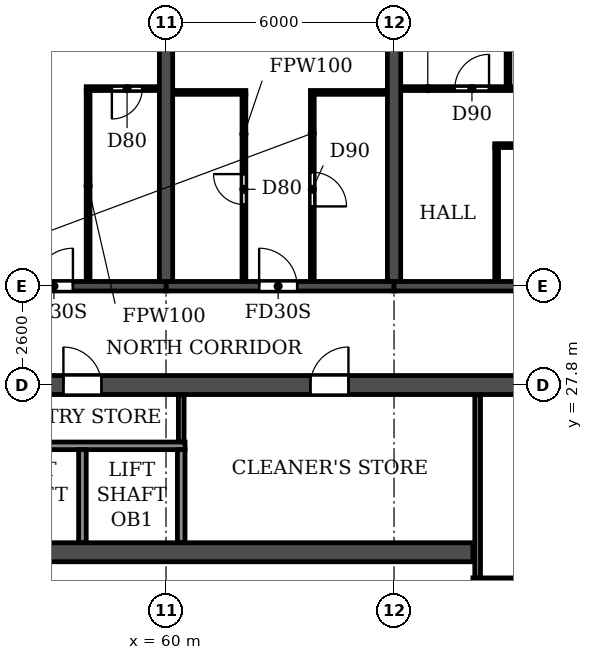
"""IFC4 building model, lengths in metres.
Left out: names, types, materials, properties, quantities, classifications, styles, units other than length and angle.
Written with IfcOpenShell. Run it as: python <this file> out.ifc"""

import sys

from ifc_helpers import new_model, si_unit, direction, frame, frame_2d, origin, place, context, subcontext, project, spatial, rectangle, extrude, element, fill, save


model = new_model("IFC4")
c1 = context("Model", 3, precision=1e-05, world=origin(), true_north=direction((0.0, 1.0)))
c2 = subcontext(c1, "Body", "Model", "MODEL_VIEW")
j1 = project(units=[si_unit("LENGTHUNIT", "METRE"), si_unit("PLANEANGLEUNIT", "RADIAN")], contexts=[c1])
p1 = place(None, origin())
s1 = spatial("IfcSite", under=j1, at=p1, CompositionType="ELEMENT")
p2 = place(p1, origin())
s2 = spatial("IfcBuilding", under=s1, at=p2, CompositionType="ELEMENT")
p3 = place(p2, frame((0.0, 0.0, 102.6)))
s3 = spatial("IfcBuildingStorey", under=s2, at=p3, CompositionType="ELEMENT", Elevation=102.6)
for number, where, z_axis, x_axis in (
    (1, (60.0, 30.525, 0.0), (0.0, 0.0, 1.0), (0.0, 1.0, 0.0)),
    (2, (66.0, 30.525, 0.0), (0.0, 0.0, 1.0), (0.0, 1.0, 0.0)),
):
    element("IfcWall", number, at=place(p3, frame(where, z_axis=z_axis, x_axis=x_axis)), inside=s3, PredefinedType="SHEAR", context=c2, shape_type="SweptSolid", body=[
        extrude(rectangle(XDim=12.875, YDim=0.35, at=frame_2d((6.438, 0.0))), origin(), (0.0, 0.0, 1.0), 3.0),
    ])
p4 = place(p3, frame((54.0, 30.4, 0.0), z_axis=(0.0, 0.0, 1.0), x_axis=(1.0, 0.0, 0.0)))
e3 = element("IfcWall", 3, at=p4, inside=s3, PredefinedType="SHEAR", context=c2, shape_type="SweptSolid", body=[
    extrude(rectangle(XDim=6.0, YDim=0.25, at=frame_2d((3.0, 0.0))), origin(), (0.0, 0.0, 1.0), 2.4),
])
p5 = place(p4, frame((2.55, 0.0, 0.0)))
e4 = element("IfcOpeningElement", 4, at=p5, cuts=e3, PredefinedType="OPENING", context=c2, shape_type="SweptSolid", body=[
    extrude(rectangle(XDim=1.0, YDim=2.1, at=frame_2d((0.5, 1.05))), frame((0.0, 0.135, 0.0), z_axis=(0.0, -1.0, 0.0), x_axis=(1.0, 0.0, 0.0)), (0.0, 0.0, 1.0), 0.27),
])
p6 = place(p3, frame((60.0, 30.4, 0.0), z_axis=(0.0, 0.0, 1.0), x_axis=(1.0, 0.0, 0.0)))
e5 = element("IfcWall", 5, at=p6, inside=s3, PredefinedType="SHEAR", context=c2, shape_type="SweptSolid", body=[
    extrude(rectangle(XDim=6.0, YDim=0.25, at=frame_2d((3.0, 0.0))), origin(), (0.0, 0.0, 1.0), 2.4),
])
p7 = place(p6, frame((2.45, 0.0, 0.0)))
e6 = element("IfcOpeningElement", 6, at=p7, cuts=e5, PredefinedType="OPENING", context=c2, shape_type="SweptSolid", body=[
    extrude(rectangle(XDim=1.0, YDim=2.1, at=frame_2d((0.5, 1.05))), frame((0.0, 0.135, 0.0), z_axis=(0.0, -1.0, 0.0), x_axis=(1.0, 0.0, 0.0)), (0.0, 0.0, 1.0), 0.27),
])
p8 = place(p3, frame((66.0, 30.4, 0.0), z_axis=(0.0, 0.0, 1.0), x_axis=(1.0, 0.0, 0.0)))
e7 = element("IfcWall", 7, at=p8, inside=s3, PredefinedType="SHEAR", context=c2, shape_type="SweptSolid", body=[
    extrude(rectangle(XDim=6.0, YDim=0.25, at=frame_2d((3.0, 0.0))), origin(), (0.0, 0.0, 1.0), 2.4),
])
p9 = place(p3, frame((8.6, 27.8, 0.0), z_axis=(0.0, 0.0, 1.0), x_axis=(1.0, 0.0, 0.0)))
e8 = element("IfcWall", 8, at=p9, inside=s3, PredefinedType="SOLIDWALL", context=c2, shape_type="SweptSolid", body=[
    extrude(rectangle(XDim=84.8, YDim=0.5, at=frame_2d((42.4, 0.0))), origin(), (0.0, 0.0, 1.0), 3.0),
])
p10 = place(p9, frame((1.35, 0.0, 0.0)))
e9 = element("IfcOpeningElement", 9, at=p10, cuts=e8, PredefinedType="OPENING", context=c2, shape_type="SweptSolid", body=[
    extrude(rectangle(XDim=1.0, YDim=2.1, at=frame_2d((0.5, 1.05))), frame((0.0, 0.26, 0.0), z_axis=(0.0, -1.0, 0.0), x_axis=(1.0, 0.0, 0.0)), (0.0, 0.0, 1.0), 0.52),
])
p11 = place(p9, frame((6.05, 0.0, 0.0)))
e10 = element("IfcOpeningElement", 10, at=p11, cuts=e8, PredefinedType="OPENING", context=c2, shape_type="SweptSolid", body=[
    extrude(rectangle(XDim=1.0, YDim=2.1, at=frame_2d((0.5, 1.05))), frame((0.0, 0.26, 0.0), z_axis=(0.0, -1.0, 0.0), x_axis=(1.0, 0.0, 0.0)), (0.0, 0.0, 1.0), 0.52),
])
p12 = place(p9, frame((10.3, 0.0, 0.0)))
e11 = element("IfcOpeningElement", 11, at=p12, cuts=e8, PredefinedType="OPENING", context=c2, shape_type="SweptSolid", body=[
    extrude(rectangle(XDim=1.0, YDim=2.1, at=frame_2d((0.5, 1.05))), frame((0.0, 0.26, 0.0), z_axis=(0.0, -1.0, 0.0), x_axis=(1.0, 0.0, 0.0)), (0.0, 0.0, 1.0), 0.52),
])
p13 = place(p9, frame((13.65, 0.0, 0.0)))
e12 = element("IfcOpeningElement", 12, at=p13, cuts=e8, PredefinedType="OPENING", context=c2, shape_type="SweptSolid", body=[
    extrude(rectangle(XDim=0.9, YDim=2.1, at=frame_2d((0.45, 1.05))), frame((0.0, 0.26, 0.0), z_axis=(0.0, -1.0, 0.0), x_axis=(1.0, 0.0, 0.0)), (0.0, 0.0, 1.0), 0.52),
])
p14 = place(p9, frame((22.85, 0.0, 0.0)))
e13 = element("IfcOpeningElement", 13, at=p14, cuts=e8, PredefinedType="OPENING", context=c2, shape_type="SweptSolid", body=[
    extrude(rectangle(XDim=0.9, YDim=2.1, at=frame_2d((0.45, 1.05))), frame((0.0, 0.26, 0.0), z_axis=(0.0, -1.0, 0.0), x_axis=(1.0, 0.0, 0.0)), (0.0, 0.0, 1.0), 0.52),
])
p15 = place(p9, frame((28.6, 0.0, 0.0)))
e14 = element("IfcOpeningElement", 14, at=p15, cuts=e8, PredefinedType="OPENING", context=c2, shape_type="SweptSolid", body=[
    extrude(rectangle(XDim=1.0, YDim=2.1, at=frame_2d((0.5, 1.05))), frame((0.0, 0.26, 0.0), z_axis=(0.0, -1.0, 0.0), x_axis=(1.0, 0.0, 0.0)), (0.0, 0.0, 1.0), 0.52),
])
p16 = place(p9, frame((33.8, 0.0, 0.0)))
e15 = element("IfcOpeningElement", 15, at=p16, cuts=e8, PredefinedType="OPENING", context=c2, shape_type="SweptSolid", body=[
    extrude(rectangle(XDim=1.0, YDim=2.1, at=frame_2d((0.5, 1.05))), frame((0.0, 0.26, 0.0), z_axis=(0.0, -1.0, 0.0), x_axis=(1.0, 0.0, 0.0)), (0.0, 0.0, 1.0), 0.52),
])
p17 = place(p9, frame((39.0, 0.0, 0.0)))
e16 = element("IfcOpeningElement", 16, at=p17, cuts=e8, PredefinedType="OPENING", context=c2, shape_type="SweptSolid", body=[
    extrude(rectangle(XDim=1.0, YDim=2.1, at=frame_2d((0.5, 1.05))), frame((0.0, 0.26, 0.0), z_axis=(0.0, -1.0, 0.0), x_axis=(1.0, 0.0, 0.0)), (0.0, 0.0, 1.0), 0.52),
])
p18 = place(p9, frame((41.9, 0.0, 0.0)))
e17 = element("IfcOpeningElement", 17, at=p18, cuts=e8, PredefinedType="OPENING", context=c2, shape_type="SweptSolid", body=[
    extrude(rectangle(XDim=1.0, YDim=2.1, at=frame_2d((0.5, 1.05))), frame((0.0, 0.26, 0.0), z_axis=(0.0, -1.0, 0.0), x_axis=(1.0, 0.0, 0.0)), (0.0, 0.0, 1.0), 0.52),
])
p19 = place(p9, frame((44.8, 0.0, 0.0)))
e18 = element("IfcOpeningElement", 18, at=p19, cuts=e8, PredefinedType="OPENING", context=c2, shape_type="SweptSolid", body=[
    extrude(rectangle(XDim=1.0, YDim=2.1, at=frame_2d((0.5, 1.05))), frame((0.0, 0.26, 0.0), z_axis=(0.0, -1.0, 0.0), x_axis=(1.0, 0.0, 0.0)), (0.0, 0.0, 1.0), 0.52),
])
p20 = place(p9, frame((48.7, 0.0, 0.0)))
e19 = element("IfcOpeningElement", 19, at=p20, cuts=e8, PredefinedType="OPENING", context=c2, shape_type="SweptSolid", body=[
    extrude(rectangle(XDim=1.0, YDim=2.1, at=frame_2d((0.5, 1.05))), frame((0.0, 0.26, 0.0), z_axis=(0.0, -1.0, 0.0), x_axis=(1.0, 0.0, 0.0)), (0.0, 0.0, 1.0), 0.52),
])
p21 = place(p9, frame((55.2, 0.0, 0.0)))
e20 = element("IfcOpeningElement", 20, at=p21, cuts=e8, PredefinedType="OPENING", context=c2, shape_type="SweptSolid", body=[
    extrude(rectangle(XDim=1.0, YDim=2.1, at=frame_2d((0.5, 1.05))), frame((0.0, 0.26, 0.0), z_axis=(0.0, -1.0, 0.0), x_axis=(1.0, 0.0, 0.0)), (0.0, 0.0, 1.0), 0.52),
])
p22 = place(p9, frame((61.05, 0.0, 0.0)))
e21 = element("IfcOpeningElement", 21, at=p22, cuts=e8, PredefinedType="OPENING", context=c2, shape_type="SweptSolid", body=[
    extrude(rectangle(XDim=0.9, YDim=2.1, at=frame_2d((0.45, 1.05))), frame((0.0, 0.26, 0.0), z_axis=(0.0, -1.0, 0.0), x_axis=(1.0, 0.0, 0.0)), (0.0, 0.0, 1.0), 0.52),
])
p23 = place(p9, frame((70.25, 0.0, 0.0)))
e22 = element("IfcOpeningElement", 22, at=p23, cuts=e8, PredefinedType="OPENING", context=c2, shape_type="SweptSolid", body=[
    extrude(rectangle(XDim=0.9, YDim=2.1, at=frame_2d((0.45, 1.05))), frame((0.0, 0.26, 0.0), z_axis=(0.0, -1.0, 0.0), x_axis=(1.0, 0.0, 0.0)), (0.0, 0.0, 1.0), 0.52),
])
p24 = place(p9, frame((73.5, 0.0, 0.0)))
e23 = element("IfcOpeningElement", 23, at=p24, cuts=e8, PredefinedType="OPENING", context=c2, shape_type="SweptSolid", body=[
    extrude(rectangle(XDim=1.0, YDim=2.1, at=frame_2d((0.5, 1.05))), frame((0.0, 0.26, 0.0), z_axis=(0.0, -1.0, 0.0), x_axis=(1.0, 0.0, 0.0)), (0.0, 0.0, 1.0), 0.52),
])
p25 = place(p9, frame((77.95, 0.0, 0.0)))
e24 = element("IfcOpeningElement", 24, at=p25, cuts=e8, PredefinedType="OPENING", context=c2, shape_type="SweptSolid", body=[
    extrude(rectangle(XDim=1.5, YDim=2.1, at=frame_2d((0.75, 1.05))), frame((0.0, 0.26, 0.0), z_axis=(0.0, -1.0, 0.0), x_axis=(1.0, 0.0, 0.0)), (0.0, 0.0, 1.0), 0.52),
])
p26 = place(p9, frame((82.9, 0.0, 0.0)))
e25 = element("IfcOpeningElement", 25, at=p26, cuts=e8, PredefinedType="OPENING", context=c2, shape_type="SweptSolid", body=[
    extrude(rectangle(XDim=1.0, YDim=2.1, at=frame_2d((0.5, 1.05))), frame((0.0, 0.26, 0.0), z_axis=(0.0, -1.0, 0.0), x_axis=(1.0, 0.0, 0.0)), (0.0, 0.0, 1.0), 0.52),
])
p27 = place(p3, frame((33.925, 23.4, 0.0), z_axis=(0.0, 0.0, 1.0), x_axis=(1.0, 0.0, 0.0)))
e26 = element("IfcWall", 26, at=p27, inside=s3, PredefinedType="SOLIDWALL", context=c2, shape_type="SweptSolid", body=[
    extrude(rectangle(XDim=34.15, YDim=0.5, at=frame_2d((17.075, 0.0))), origin(), (0.0, 0.0, 1.0), 3.0),
])
p28 = place(p27, frame((16.175, 0.0, 0.0)))
e27 = element("IfcOpeningElement", 27, at=p28, cuts=e26, PredefinedType="OPENING", context=c2, shape_type="SweptSolid", body=[
    extrude(rectangle(XDim=1.8, YDim=2.1, at=frame_2d((0.9, 1.05))), frame((0.0, 0.26, 0.0), z_axis=(0.0, -1.0, 0.0), x_axis=(1.0, 0.0, 0.0)), (0.0, 0.0, 1.0), 0.52),
])
p29 = place(p27, frame((11.025, 0.0, 0.0)))
e28 = element("IfcOpeningElement", 28, at=p29, cuts=e26, PredefinedType="OPENING", context=c2, shape_type="SweptSolid", body=[
    extrude(rectangle(XDim=1.1, YDim=2.1, at=frame_2d((0.55, 1.05))), frame((0.0, 0.26, 0.0), z_axis=(0.0, -1.0, 0.0), x_axis=(1.0, 0.0, 0.0)), (0.0, 0.0, 1.0), 0.52),
])
p30 = place(p3, frame((68.075, 22.6, 0.0), z_axis=(0.0, 0.0, 1.0), x_axis=(1.0, 0.0, 0.0)))
e29 = element("IfcWall", 29, at=p30, inside=s3, PredefinedType="SOLIDWALL", context=c2, shape_type="SweptSolid", body=[
    extrude(rectangle(XDim=4.05, YDim=0.25, at=frame_2d((2.025, 0.0))), origin(), (0.0, 0.0, 1.0), 3.0),
])
p31 = place(p3, frame((68.65, 34.1, 0.0), z_axis=(0.0, 0.0, 1.0), x_axis=(1.0, 0.0, 0.0)))
e30 = element("IfcWall", 30, at=p31, inside=s3, PredefinedType="PARTITIONING", context=c2, shape_type="SweptSolid", body=[
    extrude(rectangle(XDim=3.165, YDim=0.1, at=frame_2d((1.583, 0.0))), origin(), (0.0, 0.0, 1.0), 3.0),
])
p32 = place(p31, frame((1.3, 0.0, 0.0)))
e31 = element("IfcOpeningElement", 31, at=p32, cuts=e30, PredefinedType="OPENING", context=c2, shape_type="SweptSolid", body=[
    extrude(rectangle(XDim=0.8, YDim=2.1, at=frame_2d((0.4, 1.05))), frame((0.0, 0.06, 0.0), z_axis=(0.0, -1.0, 0.0), x_axis=(1.0, 0.0, 0.0)), (0.0, 0.0, 1.0), 0.12),
])
p33 = place(p3, frame((60.185, 35.5, 0.0), z_axis=(0.0, 0.0, 1.0), x_axis=(1.0, 0.0, 0.0)))
e32 = element("IfcWall", 32, at=p33, inside=s3, PredefinedType="PARTITIONING", context=c2, shape_type="SweptSolid", body=[
    extrude(rectangle(XDim=1.915, YDim=0.1, at=frame_2d((0.958, 0.0))), origin(), (0.0, 0.0, 1.0), 3.0),
])
p34 = place(p3, frame((63.8, 35.5, 0.0), z_axis=(0.0, 0.0, 1.0), x_axis=(1.0, 0.0, 0.0)))
e33 = element("IfcWall", 33, at=p34, inside=s3, PredefinedType="PARTITIONING", context=c2, shape_type="SweptSolid", body=[
    extrude(rectangle(XDim=2.015, YDim=0.1, at=frame_2d((1.007, 0.0))), origin(), (0.0, 0.0, 1.0), 3.0),
])
p35 = place(p3, frame((57.9, 35.6, 0.0), z_axis=(0.0, 0.0, 1.0), x_axis=(1.0, 0.0, 0.0)))
e34 = element("IfcWall", 34, at=p35, inside=s3, PredefinedType="PARTITIONING", context=c2, shape_type="SweptSolid", body=[
    extrude(rectangle(XDim=1.915, YDim=0.1, at=frame_2d((0.958, 0.0))), origin(), (0.0, 0.0, 1.0), 3.0),
])
p36 = place(p35, frame((0.675, 0.0, 0.0)))
e35 = element("IfcOpeningElement", 35, at=p36, cuts=e34, PredefinedType="OPENING", context=c2, shape_type="SweptSolid", body=[
    extrude(rectangle(XDim=0.8, YDim=2.1, at=frame_2d((0.4, 1.05))), frame((0.0, 0.06, 0.0), z_axis=(0.0, -1.0, 0.0), x_axis=(1.0, 0.0, 0.0)), (0.0, 0.0, 1.0), 0.12),
])
p37 = place(p3, frame((66.185, 35.6, 0.0), z_axis=(0.0, 0.0, 1.0), x_axis=(1.0, 0.0, 0.0)))
e36 = element("IfcWall", 36, at=p37, inside=s3, PredefinedType="PARTITIONING", context=c2, shape_type="SweptSolid", body=[
    extrude(rectangle(XDim=5.63, YDim=0.1, at=frame_2d((2.815, 0.0))), origin(), (0.0, 0.0, 1.0), 3.0),
])
p38 = place(p37, frame((1.415, 0.0, 0.0)))
e37 = element("IfcOpeningElement", 37, at=p38, cuts=e36, PredefinedType="OPENING", context=c2, shape_type="SweptSolid", body=[
    extrude(rectangle(XDim=0.9, YDim=2.1, at=frame_2d((0.45, 1.05))), frame((0.0, 0.06, 0.0), z_axis=(0.0, -1.0, 0.0), x_axis=(1.0, 0.0, 0.0)), (0.0, 0.0, 1.0), 0.12),
])
p39 = place(p37, frame((3.315, 0.0, 0.0)))
e38 = element("IfcOpeningElement", 38, at=p39, cuts=e36, PredefinedType="OPENING", context=c2, shape_type="SweptSolid", body=[
    extrude(rectangle(XDim=0.9, YDim=2.1, at=frame_2d((0.45, 1.05))), frame((0.0, 0.06, 0.0), z_axis=(0.0, -1.0, 0.0), x_axis=(1.0, 0.0, 0.0)), (0.0, 0.0, 1.0), 0.12),
])
p40 = place(p3, frame((57.95, 30.535, 0.0), z_axis=(0.0, 0.0, 1.0), x_axis=(0.0, 1.0, 0.0)))
e39 = element("IfcWall", 39, at=p40, inside=s3, PredefinedType="PARTITIONING", context=c2, shape_type="SweptSolid", body=[
    extrude(rectangle(XDim=5.015, YDim=0.1, at=frame_2d((2.508, 0.0))), origin(), (0.0, 0.0, 1.0), 3.0),
])
p41 = place(p3, frame((62.05, 30.535, 0.0), z_axis=(0.0, 0.0, 1.0), x_axis=(0.0, 1.0, 0.0)))
e40 = element("IfcWall", 40, at=p41, inside=s3, PredefinedType="PARTITIONING", context=c2, shape_type="SweptSolid", body=[
    extrude(rectangle(XDim=4.915, YDim=0.1, at=frame_2d((2.458, 0.0))), origin(), (0.0, 0.0, 1.0), 3.0),
])
p42 = place(p41, frame((2.015, 0.0, 0.0)))
e41 = element("IfcOpeningElement", 41, at=p42, cuts=e40, PredefinedType="OPENING", context=c2, shape_type="SweptSolid", body=[
    extrude(rectangle(XDim=0.8, YDim=2.1, at=frame_2d((0.4, 1.05))), frame((0.0, 0.06, 0.0), z_axis=(0.0, -1.0, 0.0), x_axis=(1.0, 0.0, 0.0)), (0.0, 0.0, 1.0), 0.12),
])
p43 = place(p3, frame((63.85, 30.535, 0.0), z_axis=(0.0, 0.0, 1.0), x_axis=(0.0, 1.0, 0.0)))
e42 = element("IfcWall", 42, at=p43, inside=s3, PredefinedType="PARTITIONING", context=c2, shape_type="SweptSolid", body=[
    extrude(rectangle(XDim=4.915, YDim=0.1, at=frame_2d((2.458, 0.0))), origin(), (0.0, 0.0, 1.0), 3.0),
])
p44 = place(p43, frame((1.965, 0.0, 0.0)))
e43 = element("IfcOpeningElement", 43, at=p44, cuts=e42, PredefinedType="OPENING", context=c2, shape_type="SweptSolid", body=[
    extrude(rectangle(XDim=0.9, YDim=2.1, at=frame_2d((0.45, 1.05))), frame((0.0, 0.06, 0.0), z_axis=(0.0, -1.0, 0.0), x_axis=(1.0, 0.0, 0.0)), (0.0, 0.0, 1.0), 0.12),
])
p45 = place(p3, frame((68.7, 30.535, 0.0), z_axis=(0.0, 0.0, 1.0), x_axis=(0.0, 1.0, 0.0)))
e44 = element("IfcWall", 44, at=p45, inside=s3, PredefinedType="PARTITIONING", context=c2, shape_type="SweptSolid", body=[
    extrude(rectangle(XDim=3.515, YDim=0.1, at=frame_2d((1.758, 0.0))), origin(), (0.0, 0.0, 1.0), 3.0),
])
p46 = place(p3, frame((69.0, 35.65, 0.0), z_axis=(0.0, 0.0, 1.0), x_axis=(0.0, 1.0, 0.0)))
e45 = element("IfcWall", 45, at=p46, inside=s3, PredefinedType="PARTITIONING", context=c2, shape_type="SweptSolid", body=[
    extrude(rectangle(XDim=7.89, YDim=0.1, at=frame_2d((3.945, 0.0))), origin(), (0.0, 0.0, 1.0), 3.0),
])
p47 = place(p3, frame((60.4, 26.3, 0.0), z_axis=(0.0, 0.0, 1.0), x_axis=(0.0, 1.0, 0.0)))
e46 = element("IfcWall", 46, at=p47, inside=s3, PredefinedType="PARTITIONING", context=c2, shape_type="SweptSolid", body=[
    extrude(rectangle(XDim=1.24, YDim=0.15, at=frame_2d((0.62, 0.0))), origin(), (0.0, 0.0, 1.0), 3.0),
])
p48 = place(p3, frame((68.2, 22.735, 0.0), z_axis=(0.0, 0.0, 1.0), x_axis=(0.0, 1.0, 0.0)))
e47 = element("IfcWall", 47, at=p48, inside=s3, PredefinedType="PARTITIONING", context=c2, shape_type="SweptSolid", body=[
    extrude(rectangle(XDim=4.805, YDim=0.15, at=frame_2d((2.402, 0.0))), origin(), (0.0, 0.0, 1.0), 3.0),
])
p49 = place(p3, frame((52.5, 26.2, 0.0), z_axis=(0.0, 0.0, 1.0), x_axis=(1.0, 0.0, 0.0)))
e48 = element("IfcWall", 48, at=p49, inside=s3, PredefinedType="PARTITIONING", context=c2, shape_type="SweptSolid", body=[
    extrude(rectangle(XDim=8.0, YDim=0.2, at=frame_2d((4.0, 0.0))), origin(), (0.0, 0.0, 1.0), 3.0),
])
for number, where, z_axis, x_axis in (
    (49, (57.8, 23.66, 0.0), (0.0, 0.0, 1.0), (0.0, 1.0, 0.0)),
    (50, (60.4, 23.66, 0.0), (0.0, 0.0, 1.0), (0.0, 1.0, 0.0)),
):
    element("IfcWall", number, at=place(p3, frame(where, z_axis=z_axis, x_axis=x_axis)), inside=s3, PredefinedType="PARTITIONING", context=c2, shape_type="SweptSolid", body=[
        extrude(rectangle(XDim=2.44, YDim=0.2, at=frame_2d((1.22, 0.0))), origin(), (0.0, 0.0, 1.0), 3.0),
    ])
p50 = place(p20, origin())
e51 = element("IfcDoor", 51, at=p50, inside=s3, OperationType="SINGLE_SWING_LEFT", PredefinedType="DOOR", context=c2, shape_type="SweptSolid", body=[
    extrude(rectangle(XDim=1.0, YDim=2.1, at=frame_2d((0.5, 1.05))), frame((0.0, 0.025, 0.0), z_axis=(0.0, -1.0, 0.0), x_axis=(1.0, 0.0, 0.0)), (0.0, 0.0, 1.0), 0.05),
])
fill(e19, e51)
p51 = place(p21, origin())
e52 = element("IfcDoor", 52, at=p51, inside=s3, OperationType="SINGLE_SWING_RIGHT", PredefinedType="DOOR", context=c2, shape_type="SweptSolid", body=[
    extrude(rectangle(XDim=1.0, YDim=2.1, at=frame_2d((0.5, 1.05))), frame((0.0, 0.025, 0.0), z_axis=(0.0, -1.0, 0.0), x_axis=(1.0, 0.0, 0.0)), (0.0, 0.0, 1.0), 0.05),
])
fill(e20, e52)
p52 = place(p5, origin())
e53 = element("IfcDoor", 53, at=p52, inside=s3, OperationType="SINGLE_SWING_RIGHT", PredefinedType="DOOR", context=c2, shape_type="SweptSolid", body=[
    extrude(rectangle(XDim=1.0, YDim=2.1, at=frame_2d((0.5, 1.05))), frame((0.0, 0.025, 0.0), z_axis=(0.0, -1.0, 0.0), x_axis=(1.0, 0.0, 0.0)), (0.0, 0.0, 1.0), 0.05),
])
fill(e4, e53)
p53 = place(p36, frame((0.8, 0.0, 0.0), z_axis=(0.0, 0.0, 1.0), x_axis=(-1.0, 0.0, 0.0)))
e54 = element("IfcDoor", 54, at=p53, inside=s3, OperationType="SINGLE_SWING_RIGHT", PredefinedType="DOOR", context=c2, shape_type="SweptSolid", body=[
    extrude(rectangle(XDim=0.8, YDim=2.1, at=frame_2d((0.4, 1.05))), frame((0.0, 0.025, 0.0), z_axis=(0.0, -1.0, 0.0), x_axis=(1.0, 0.0, 0.0)), (0.0, 0.0, 1.0), 0.05),
])
fill(e35, e54)
p54 = place(p42, origin())
e55 = element("IfcDoor", 55, at=p54, inside=s3, OperationType="SINGLE_SWING_RIGHT", PredefinedType="DOOR", context=c2, shape_type="SweptSolid", body=[
    extrude(rectangle(XDim=0.8, YDim=2.1, at=frame_2d((0.4, 1.05))), frame((0.0, 0.025, 0.0), z_axis=(0.0, -1.0, 0.0), x_axis=(1.0, 0.0, 0.0)), (0.0, 0.0, 1.0), 0.05),
])
fill(e41, e55)
p55 = place(p7, origin())
e56 = element("IfcDoor", 56, at=p55, inside=s3, OperationType="SINGLE_SWING_LEFT", PredefinedType="DOOR", context=c2, shape_type="SweptSolid", body=[
    extrude(rectangle(XDim=1.0, YDim=2.1, at=frame_2d((0.5, 1.05))), frame((0.0, 0.025, 0.0), z_axis=(0.0, -1.0, 0.0), x_axis=(1.0, 0.0, 0.0)), (0.0, 0.0, 1.0), 0.05),
])
fill(e6, e56)
p56 = place(p44, frame((0.9, 0.0, 0.0), z_axis=(0.0, 0.0, 1.0), x_axis=(-1.0, 0.0, 0.0)))
e57 = element("IfcDoor", 57, at=p56, inside=s3, OperationType="SINGLE_SWING_RIGHT", PredefinedType="DOOR", context=c2, shape_type="SweptSolid", body=[
    extrude(rectangle(XDim=0.9, YDim=2.1, at=frame_2d((0.45, 1.05))), frame((0.0, 0.025, 0.0), z_axis=(0.0, -1.0, 0.0), x_axis=(1.0, 0.0, 0.0)), (0.0, 0.0, 1.0), 0.05),
])
fill(e43, e57)
p57 = place(p38, origin())
e58 = element("IfcDoor", 58, at=p57, inside=s3, OperationType="SINGLE_SWING_RIGHT", PredefinedType="DOOR", context=c2, shape_type="SweptSolid", body=[
    extrude(rectangle(XDim=0.9, YDim=2.1, at=frame_2d((0.45, 1.05))), frame((0.0, 0.025, 0.0), z_axis=(0.0, -1.0, 0.0), x_axis=(1.0, 0.0, 0.0)), (0.0, 0.0, 1.0), 0.05),
])
fill(e37, e58)
save(model, sys.argv[1])
